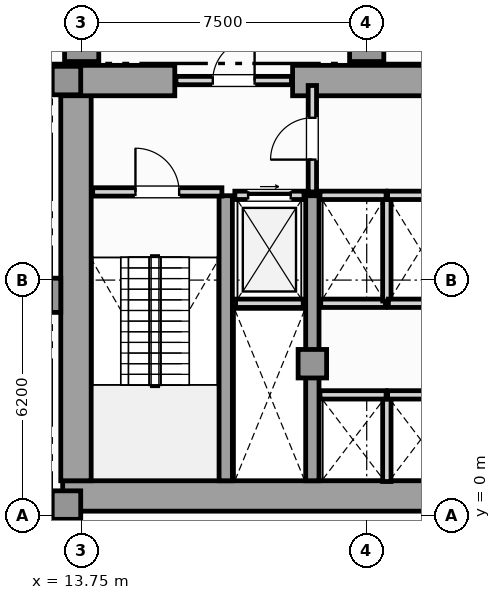
"""IFC4 building model, lengths in metres.
Left out: names, types, materials, properties, quantities, classifications, styles, units other than length and angle.
Written with IfcOpenShell. Run it as: python <this file> out.ifc"""

import sys

from ifc_helpers import new_model, si_unit, direction, frame, frame_2d, origin, origin_2d, place, context, subcontext, project, spatial, rectangle, extrude, element, fill, save


model = new_model("IFC4")
c1 = context("Model", 3, precision=1e-05, world=origin(), true_north=direction((0.0, 1.0)))
c2 = subcontext(c1, "Body", "Model", "MODEL_VIEW")
j1 = project(units=[si_unit("LENGTHUNIT", "METRE"), si_unit("PLANEANGLEUNIT", "RADIAN")], contexts=[c1])
p1 = place(None, origin())
s1 = spatial("IfcSite", under=j1, at=p1, CompositionType="ELEMENT")
p2 = place(p1, origin())
s2 = spatial("IfcBuilding", under=s1, at=p2, CompositionType="ELEMENT")
p3 = place(p2, frame((0.0, 0.0, 10.2)))
s3 = spatial("IfcBuildingStorey", under=s2, at=p3, CompositionType="ELEMENT", Elevation=10.2)
p4 = place(p3, frame((13.25, 0.52, 0.0), z_axis=(0.0, 0.0, 1.0), x_axis=(1.0, 0.0, 0.0)))
e1 = element("IfcWall", 1, at=p4, inside=s3, PredefinedType="SHEAR", context=c2, shape_type="SweptSolid", body=[
    extrude(rectangle(XDim=31.0, YDim=0.8, at=frame_2d((15.5, 0.0))), origin(), (0.0, 0.0, 1.0), 4.52),
])
p5 = place(p3, frame((13.6, 0.92, 0.0), z_axis=(0.0, 0.0, 1.0), x_axis=(0.0, 1.0, 0.0)))
e2 = element("IfcWall", 2, at=p5, inside=s3, PredefinedType="SHEAR", context=c2, shape_type="SweptSolid", body=[
    extrude(rectangle(XDim=10.53, YDim=0.8, at=frame_2d((5.265, 0.0))), origin(), (0.0, 0.0, 1.0), 4.52),
])
p6 = place(p3, frame((13.25, 11.45, 0.0), z_axis=(0.0, 0.0, 1.0), x_axis=(1.0, 0.0, 0.0)))
e3 = element("IfcWall", 3, at=p6, inside=s3, PredefinedType="SHEAR", context=c2, shape_type="SweptSolid", body=[
    extrude(rectangle(XDim=2.95, YDim=0.8, at=frame_2d((1.475, 0.0))), origin(), (0.0, 0.0, 1.0), 4.52),
])
p7 = place(p3, frame((19.3, 11.45, 0.0), z_axis=(0.0, 0.0, 1.0), x_axis=(1.0, 0.0, 0.0)))
e4 = element("IfcWall", 4, at=p7, inside=s3, PredefinedType="SHEAR", context=c2, shape_type="SweptSolid", body=[
    extrude(rectangle(XDim=7.3, YDim=0.8, at=frame_2d((3.65, 0.0))), origin(), (0.0, 0.0, 1.0), 4.52),
])
for number, where, z_axis, x_axis in (
    (5, (17.54, 0.92, 0.0), (0.0, 0.0, 1.0), (0.0, 1.0, 0.0)),
    (6, (19.82, 0.92, 0.0), (0.0, 0.0, 1.0), (0.0, 1.0, 0.0)),
):
    element("IfcWall", number, at=place(p3, frame(where, z_axis=z_axis, x_axis=x_axis)), inside=s3, PredefinedType="SHEAR", context=c2, shape_type="SweptSolid", body=[
        extrude(rectangle(XDim=7.5, YDim=0.35, at=frame_2d((3.75, 0.0))), origin(), (0.0, 0.0, 1.0), 4.52),
    ])
p8 = place(p3, frame((12.9, 5.8, 0.0), z_axis=(0.0, 0.0, 1.0), x_axis=(1.0, 0.0, 0.0)))
e7 = element("IfcColumn", 7, at=p8, inside=s3, PredefinedType="PILASTER", context=c2, shape_type="SweptSolid", body=[
    extrude(rectangle(XDim=0.6, YDim=0.9, at=origin_2d()), origin(), (0.0, 0.0, 1.0), 4.8),
])
for number, where, z_axis, x_axis in (
    (8, (13.35, 0.28, 0.0), (0.0, 0.0, 1.0), (1.0, 0.0, 0.0)),
    (9, (13.35, 11.45, 0.0), (0.0, 0.0, 1.0), (1.0, 0.0, 0.0)),
    (10, (19.82, 4.0, 0.0), (0.0, 0.0, 1.0), (1.0, 0.0, 0.0)),
):
    element("IfcColumn", number, at=place(p3, frame(where, z_axis=z_axis, x_axis=x_axis)), inside=s3, PredefinedType="COLUMN", context=c2, shape_type="SweptSolid", body=[
        extrude(rectangle(XDim=0.75, YDim=0.75, at=origin_2d()), origin(), (0.0, 0.0, 1.0), 4.8),
    ])
for number, where, z_axis, x_axis in (
    (11, (13.75, 12.4, 0.0), (0.0, 0.0, 1.0), (1.0, 0.0, 0.0)),
    (12, (21.25, 12.4, 0.0), (0.0, 0.0, 1.0), (1.0, 0.0, 0.0)),
):
    element("IfcColumn", number, at=place(p3, frame(where, z_axis=z_axis, x_axis=x_axis)), inside=s3, PredefinedType="COLUMN", context=c2, shape_type="SweptSolid", body=[
        extrude(rectangle(XDim=0.9, YDim=0.9, at=origin_2d()), origin(), (0.0, 0.0, 1.0), 4.8),
    ])
p9 = place(p3, frame((17.8, 5.59, 0.0), z_axis=(0.0, 0.0, 1.0), x_axis=(1.0, 0.0, 0.0)))
e13 = element("IfcWall", 13, at=p9, inside=s3, PredefinedType="SOLIDWALL", context=c2, shape_type="SweptSolid", body=[
    extrude(rectangle(XDim=1.78, YDim=0.22, at=frame_2d((0.89, 0.0))), origin(), (0.0, 0.0, 1.0), 4.52),
])
p10 = place(p3, frame((17.78, 8.43, 0.0), z_axis=(0.0, 0.0, 1.0), x_axis=(1.0, 0.0, 0.0)))
e14 = element("IfcWall", 14, at=p10, inside=s3, PredefinedType="SOLIDWALL", context=c2, shape_type="SweptSolid", body=[
    extrude(rectangle(XDim=1.82, YDim=0.22, at=frame_2d((0.91, 0.0))), origin(), (0.0, 0.0, 1.0), 4.52),
])
p11 = place(p10, frame((0.35, 0.0, 0.0)))
e15 = element("IfcOpeningElement", 15, at=p11, cuts=e14, PredefinedType="OPENING", context=c2, shape_type="SweptSolid", body=[
    extrude(rectangle(XDim=1.12, YDim=2.25, at=frame_2d((0.56, 1.125))), frame((0.0, 0.12, 0.0), z_axis=(0.0, -1.0, 0.0), x_axis=(1.0, 0.0, 0.0)), (0.0, 0.0, 1.0), 0.24),
])
p12 = place(p3, frame((21.78, 0.9, 0.0), z_axis=(0.0, 0.0, 1.0), x_axis=(0.0, 1.0, 0.0)))
e16 = element("IfcWall", 16, at=p12, inside=s3, PredefinedType="SOLIDWALL", context=c2, shape_type="SweptSolid", body=[
    extrude(rectangle(XDim=2.2, YDim=0.22, at=frame_2d((1.1, 0.0))), origin(), (0.0, 0.0, 1.0), 4.52),
])
for number, where, z_axis, x_axis in (
    (17, (20.02, 3.18, 0.0), (0.0, 0.0, 1.0), (1.0, 0.0, 0.0)),
    (18, (21.8, 3.18, 0.0), (0.0, 0.0, 1.0), (1.0, 0.0, 0.0)),
):
    element("IfcWall", number, at=place(p3, frame(where, z_axis=z_axis, x_axis=x_axis)), inside=s3, PredefinedType="SOLIDWALL", context=c2, shape_type="SweptSolid", body=[
        extrude(rectangle(XDim=1.74, YDim=0.22, at=frame_2d((0.87, 0.0))), origin(), (0.0, 0.0, 1.0), 4.52),
    ])
p13 = place(p3, frame((20.04, 5.59, 0.0), z_axis=(0.0, 0.0, 1.0), x_axis=(1.0, 0.0, 0.0)))
e19 = element("IfcWall", 19, at=p13, inside=s3, PredefinedType="SOLIDWALL", context=c2, shape_type="SweptSolid", body=[
    extrude(rectangle(XDim=1.7, YDim=0.22, at=frame_2d((0.85, 0.0))), origin(), (0.0, 0.0, 1.0), 4.52),
])
p14 = place(p3, frame((21.78, 5.65, 0.0), z_axis=(0.0, 0.0, 1.0), x_axis=(0.0, 1.0, 0.0)))
e20 = element("IfcWall", 20, at=p14, inside=s3, PredefinedType="SOLIDWALL", context=c2, shape_type="SweptSolid", body=[
    extrude(rectangle(XDim=2.7, YDim=0.22, at=frame_2d((1.35, 0.0))), origin(), (0.0, 0.0, 1.0), 4.52),
])
p15 = place(p3, frame((20.02, 8.43, 0.0), z_axis=(0.0, 0.0, 1.0), x_axis=(1.0, 0.0, 0.0)))
e21 = element("IfcWall", 21, at=p15, inside=s3, PredefinedType="SOLIDWALL", context=c2, shape_type="SweptSolid", body=[
    extrude(rectangle(XDim=1.74, YDim=0.22, at=frame_2d((0.87, 0.0))), origin(), (0.0, 0.0, 1.0), 4.52),
])
p16 = place(p3, frame((21.82, 5.59, 0.0), z_axis=(0.0, 0.0, 1.0), x_axis=(1.0, 0.0, 0.0)))
e22 = element("IfcWall", 22, at=p16, inside=s3, PredefinedType="SOLIDWALL", context=c2, shape_type="SweptSolid", body=[
    extrude(rectangle(XDim=1.7, YDim=0.22, at=frame_2d((0.85, 0.0))), origin(), (0.0, 0.0, 1.0), 4.52),
])
p17 = place(p3, frame((21.8, 8.43, 0.0), z_axis=(0.0, 0.0, 1.0), x_axis=(1.0, 0.0, 0.0)))
e23 = element("IfcWall", 23, at=p17, inside=s3, PredefinedType="SOLIDWALL", context=c2, shape_type="SweptSolid", body=[
    extrude(rectangle(XDim=1.74, YDim=0.22, at=frame_2d((0.87, 0.0))), origin(), (0.0, 0.0, 1.0), 4.52),
])
p18 = place(p3, frame((14.04, 8.52, 0.0), z_axis=(0.0, 0.0, 1.0), x_axis=(1.0, 0.0, 0.0)))
e24 = element("IfcWall", 24, at=p18, inside=s3, PredefinedType="SOLIDWALL", context=c2, shape_type="SweptSolid", body=[
    extrude(rectangle(XDim=3.4, YDim=0.22, at=frame_2d((1.7, 0.0))), origin(), (0.0, 0.0, 1.0), 4.52),
])
p19 = place(p18, frame((1.125, 0.0, 0.0)))
e25 = element("IfcOpeningElement", 25, at=p19, cuts=e24, PredefinedType="OPENING", context=c2, shape_type="SweptSolid", body=[
    extrude(rectangle(XDim=1.15, YDim=2.2, at=frame_2d((0.575, 1.1))), frame((0.0, 0.12, 0.0), z_axis=(0.0, -1.0, 0.0), x_axis=(1.0, 0.0, 0.0)), (0.0, 0.0, 1.0), 0.24),
])
p20 = place(p3, frame((19.82, 8.52, 0.0), z_axis=(0.0, 0.0, 1.0), x_axis=(0.0, 1.0, 0.0)))
e26 = element("IfcWall", 26, at=p20, inside=s3, PredefinedType="SOLIDWALL", context=c2, shape_type="SweptSolid", body=[
    extrude(rectangle(XDim=2.8, YDim=0.22, at=frame_2d((1.4, 0.0))), origin(), (0.0, 0.0, 1.0), 3.976),
])
p21 = place(p20, frame((0.85, 0.0, 0.0)))
e27 = element("IfcOpeningElement", 27, at=p21, cuts=e26, PredefinedType="OPENING", context=c2, shape_type="SweptSolid", body=[
    extrude(rectangle(XDim=1.1, YDim=2.2, at=frame_2d((0.55, 1.1))), frame((0.0, 0.12, 0.0), z_axis=(0.0, -1.0, 0.0), x_axis=(1.0, 0.0, 0.0)), (0.0, 0.0, 1.0), 0.24),
])
p22 = place(p3, frame((16.23, 11.45, 0.0), z_axis=(0.0, 0.0, 1.0), x_axis=(1.0, 0.0, 0.0)))
e28 = element("IfcWall", 28, at=p22, inside=s3, PredefinedType="SOLIDWALL", context=c2, shape_type="SweptSolid", body=[
    extrude(rectangle(XDim=3.04, YDim=0.22, at=frame_2d((1.52, 0.0))), origin(), (0.0, 0.0, 1.0), 4.52),
])
p23 = place(p22, frame((0.97, 0.0, 0.0)))
e29 = element("IfcOpeningElement", 29, at=p23, cuts=e28, PredefinedType="OPENING", context=c2, shape_type="SweptSolid", body=[
    extrude(rectangle(XDim=1.1, YDim=2.2, at=frame_2d((0.55, 1.1))), frame((0.0, 0.12, 0.0), z_axis=(0.0, -1.0, 0.0), x_axis=(1.0, 0.0, 0.0)), (0.0, 0.0, 1.0), 0.24),
])
p24 = place(p11, origin())
e30 = element("IfcDoor", 30, at=p24, inside=s3, OperationType="SLIDING_TO_RIGHT", PredefinedType="DOOR", context=c2, shape_type="SweptSolid", body=[
    extrude(rectangle(XDim=1.12, YDim=2.25, at=frame_2d((0.56, 1.125))), frame((0.0, 0.025, 0.0), z_axis=(0.0, -1.0, 0.0), x_axis=(1.0, 0.0, 0.0)), (0.0, 0.0, 1.0), 0.05),
])
fill(e15, e30)
p25 = place(p19, origin())
e31 = element("IfcDoor", 31, at=p25, inside=s3, OperationType="SINGLE_SWING_LEFT", PredefinedType="DOOR", context=c2, shape_type="SweptSolid", body=[
    extrude(rectangle(XDim=1.15, YDim=2.2, at=frame_2d((0.575, 1.1))), frame((0.0, 0.025, 0.0), z_axis=(0.0, -1.0, 0.0), x_axis=(1.0, 0.0, 0.0)), (0.0, 0.0, 1.0), 0.05),
])
fill(e25, e31)
p26 = place(p21, origin())
e32 = element("IfcDoor", 32, at=p26, inside=s3, OperationType="SINGLE_SWING_LEFT", PredefinedType="DOOR", context=c2, shape_type="SweptSolid", body=[
    extrude(rectangle(XDim=1.1, YDim=2.2, at=frame_2d((0.55, 1.1))), frame((0.0, 0.025, 0.0), z_axis=(0.0, -1.0, 0.0), x_axis=(1.0, 0.0, 0.0)), (0.0, 0.0, 1.0), 0.05),
])
fill(e27, e32)
p27 = place(p23, origin())
e33 = element("IfcDoor", 33, at=p27, inside=s3, OperationType="SINGLE_SWING_RIGHT", PredefinedType="DOOR", context=c2, shape_type="SweptSolid", body=[
    extrude(rectangle(XDim=1.1, YDim=2.2, at=frame_2d((0.55, 1.1))), frame((0.0, 0.025, 0.0), z_axis=(0.0, -1.0, 0.0), x_axis=(1.0, 0.0, 0.0)), (0.0, 0.0, 1.0), 0.05),
])
fill(e29, e33)
save(model, sys.argv[1])
